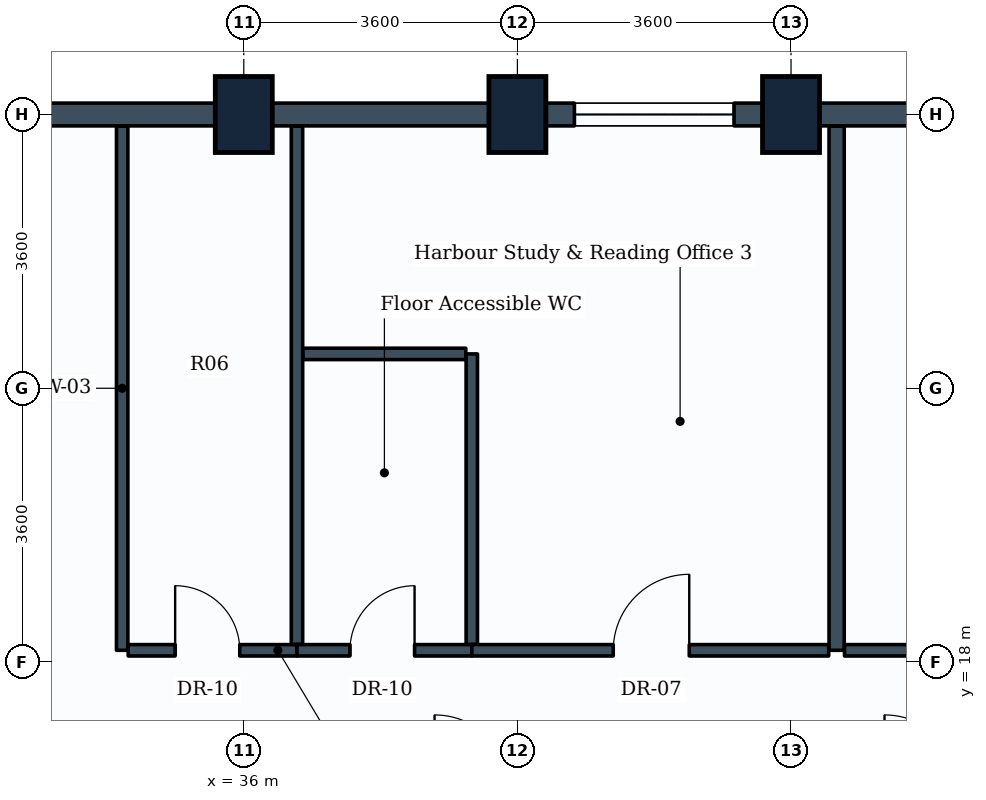
"""IFC4 building model, lengths in metres.
Left out: names, types, materials, properties, quantities, classifications, styles, units other than length and angle.
Written with IfcOpenShell. Run it as: python <this file> out.ifc"""

import sys

from ifc_helpers import new_model, si_unit, direction, frame, frame_2d, origin, origin_2d, place, context, subcontext, project, spatial, rectangle, extrude, element, fill, save


model = new_model("IFC4")
c1 = context("Model", 3, precision=1e-05, world=origin(), true_north=direction((0.0, 1.0)))
c2 = subcontext(c1, "Body", "Model", "MODEL_VIEW")
j1 = project(units=[si_unit("LENGTHUNIT", "METRE"), si_unit("PLANEANGLEUNIT", "RADIAN")], contexts=[c1])
p1 = place(None, origin())
s1 = spatial("IfcSite", under=j1, at=p1, CompositionType="ELEMENT")
p2 = place(p1, origin())
s2 = spatial("IfcBuilding", under=s1, at=p2, CompositionType="ELEMENT")
p3 = place(p2, frame((0.0, 0.0, 139.0)))
s3 = spatial("IfcBuildingStorey", under=s2, at=p3, CompositionType="ELEMENT", Elevation=139.0)
for number, where, z_axis, x_axis in (
    (1, (36.0, 25.2, 0.0), (0.0, 0.0, 1.0), (1.0, 0.0, 0.0)),
    (2, (39.6, 25.2, 0.0), (0.0, 0.0, 1.0), (1.0, 0.0, 0.0)),
    (3, (43.2, 25.2, 0.0), (0.0, 0.0, 1.0), (1.0, 0.0, 0.0)),
):
    element("IfcColumn", number, at=place(p3, frame(where, z_axis=z_axis, x_axis=x_axis)), inside=s3, PredefinedType="COLUMN", context=c2, shape_type="SweptSolid", body=[
        extrude(rectangle(XDim=0.75, YDim=1.0, at=origin_2d()), origin(), (0.0, 0.0, 1.0), 3.8),
    ])
p4 = place(p3, frame((43.2, 25.2, 0.0), z_axis=(0.0, 0.0, 1.0), x_axis=(1.0, 0.0, 0.0)))
e4 = element("IfcWall", 4, at=p4, inside=s3, PredefinedType="STANDARD", context=c2, shape_type="SweptSolid", body=[
    extrude(rectangle(XDim=3.6, YDim=0.3, at=frame_2d((1.8, 0.0))), origin(), (0.0, 0.0, 1.0), 2.93),
])
p5 = place(p3, frame((39.6, 25.2, 0.0), z_axis=(0.0, 0.0, 1.0), x_axis=(1.0, 0.0, 0.0)))
e5 = element("IfcWall", 5, at=p5, inside=s3, PredefinedType="STANDARD", context=c2, shape_type="SweptSolid", body=[
    extrude(rectangle(XDim=3.6, YDim=0.3, at=frame_2d((1.8, 0.0))), origin(), (0.0, 0.0, 1.0), 2.93),
])
p6 = place(p5, frame((0.75, 0.0, 0.85)))
e6 = element("IfcOpeningElement", 6, at=p6, cuts=e5, PredefinedType="OPENING", context=c2, shape_type="SweptSolid", body=[
    extrude(rectangle(XDim=2.1, YDim=1.35, at=frame_2d((1.05, 0.675))), frame((0.0, 0.16, 0.0), z_axis=(0.0, -1.0, 0.0), x_axis=(1.0, 0.0, 0.0)), (0.0, 0.0, 1.0), 0.32),
])
for number, where, z_axis, x_axis in (
    (7, (36.0, 25.2, 0.0), (0.0, 0.0, 1.0), (1.0, 0.0, 0.0)),
    (8, (32.4, 25.2, 0.0), (0.0, 0.0, 1.0), (1.0, 0.0, 0.0)),
):
    element("IfcWall", number, at=place(p3, frame(where, z_axis=z_axis, x_axis=x_axis)), inside=s3, PredefinedType="STANDARD", context=c2, shape_type="SweptSolid", body=[
        extrude(rectangle(XDim=3.6, YDim=0.3, at=frame_2d((1.8, 0.0))), origin(), (0.0, 0.0, 1.0), 2.93),
    ])
p7 = place(p3, frame((34.4, 18.15, 0.0), z_axis=(0.0, 0.0, 1.0), x_axis=(0.0, 1.0, 0.0)))
e9 = element("IfcWall", 9, at=p7, inside=s3, PredefinedType="PARTITIONING", context=c2, shape_type="SweptSolid", body=[
    extrude(rectangle(XDim=6.896, YDim=0.15, at=frame_2d((3.448, 0.0))), origin(), (0.0, 0.0, 1.0), 2.93),
])
p8 = place(p3, frame((34.479, 18.15, 0.0), z_axis=(0.0, 0.0, 1.0), x_axis=(1.0, 0.0, 0.0)))
e10 = element("IfcWall", 10, at=p8, inside=s3, PredefinedType="PARTITIONING", context=c2, shape_type="SweptSolid", body=[
    extrude(rectangle(XDim=2.221, YDim=0.15, at=frame_2d((1.11, 0.0))), origin(), (0.0, 0.0, 1.0), 3.08),
])
p9 = place(p8, frame((0.618, 0.0, 0.0)))
e11 = element("IfcOpeningElement", 11, at=p9, cuts=e10, PredefinedType="OPENING", context=c2, shape_type="SweptSolid", body=[
    extrude(rectangle(XDim=0.85, YDim=2.1, at=frame_2d((0.425, 1.05))), frame((0.0, 0.085, 0.0), z_axis=(0.0, -1.0, 0.0), x_axis=(1.0, 0.0, 0.0)), (0.0, 0.0, 1.0), 0.17),
])
p10 = place(p3, frame((36.7, 18.229, 0.0), z_axis=(0.0, 0.0, 1.0), x_axis=(0.0, 1.0, 0.0)))
e12 = element("IfcWall", 12, at=p10, inside=s3, PredefinedType="PARTITIONING", context=c2, shape_type="SweptSolid", body=[
    extrude(rectangle(XDim=6.817, YDim=0.15, at=frame_2d((3.408, 0.0))), origin(), (0.0, 0.0, 1.0), 2.93),
])
p11 = place(p3, frame((36.7, 18.15, 0.0), z_axis=(0.0, 0.0, 1.0), x_axis=(1.0, 0.0, 0.0)))
e13 = element("IfcWall", 13, at=p11, inside=s3, PredefinedType="PARTITIONING", context=c2, shape_type="SweptSolid", body=[
    extrude(rectangle(XDim=2.3, YDim=0.15, at=frame_2d((1.15, 0.0))), origin(), (0.0, 0.0, 1.0), 3.08),
])
p12 = place(p11, frame((0.697, 0.0, 0.0)))
e14 = element("IfcOpeningElement", 14, at=p12, cuts=e13, PredefinedType="OPENING", context=c2, shape_type="SweptSolid", body=[
    extrude(rectangle(XDim=0.85, YDim=2.1, at=frame_2d((0.425, 1.05))), frame((0.0, 0.085, 0.0), z_axis=(0.0, -1.0, 0.0), x_axis=(1.0, 0.0, 0.0)), (0.0, 0.0, 1.0), 0.17),
])
p13 = place(p3, frame((39.0, 18.229, 0.0), z_axis=(0.0, 0.0, 1.0), x_axis=(0.0, 1.0, 0.0)))
e15 = element("IfcWall", 15, at=p13, inside=s3, PredefinedType="PARTITIONING", context=c2, shape_type="SweptSolid", body=[
    extrude(rectangle(XDim=3.821, YDim=0.15, at=frame_2d((1.911, 0.0))), origin(), (0.0, 0.0, 1.0), 3.08),
])
p14 = place(p3, frame((36.779, 22.05, 0.0), z_axis=(0.0, 0.0, 1.0), x_axis=(1.0, 0.0, 0.0)))
e16 = element("IfcWall", 16, at=p14, inside=s3, PredefinedType="PARTITIONING", context=c2, shape_type="SweptSolid", body=[
    extrude(rectangle(XDim=2.142, YDim=0.15, at=frame_2d((1.071, 0.0))), origin(), (0.0, 0.0, 1.0), 3.535),
])
p15 = place(p3, frame((43.8, 18.15, 0.0), z_axis=(0.0, 0.0, 1.0), x_axis=(0.0, 1.0, 0.0)))
e17 = element("IfcWall", 17, at=p15, inside=s3, PredefinedType="PARTITIONING", context=c2, shape_type="SweptSolid", body=[
    extrude(rectangle(XDim=6.896, YDim=0.2, at=frame_2d((3.448, 0.0))), origin(), (0.0, 0.0, 1.0), 2.93),
])
p16 = place(p3, frame((39.0, 18.15, 0.0), z_axis=(0.0, 0.0, 1.0), x_axis=(1.0, 0.0, 0.0)))
e18 = element("IfcWall", 18, at=p16, inside=s3, PredefinedType="PARTITIONING", context=c2, shape_type="SweptSolid", body=[
    extrude(rectangle(XDim=4.696, YDim=0.15, at=frame_2d((2.348, 0.0))), origin(), (0.0, 0.0, 1.0), 3.08),
])
p17 = place(p16, frame((1.861, 0.0, 0.0)))
e19 = element("IfcOpeningElement", 19, at=p17, cuts=e18, PredefinedType="OPENING", context=c2, shape_type="SweptSolid", body=[
    extrude(rectangle(XDim=1.0, YDim=2.1, at=frame_2d((0.5, 1.05))), frame((0.0, 0.085, 0.0), z_axis=(0.0, -1.0, 0.0), x_axis=(1.0, 0.0, 0.0)), (0.0, 0.0, 1.0), 0.17),
])
p18 = place(p3, frame((43.904, 18.15, 0.0), z_axis=(0.0, 0.0, 1.0), x_axis=(1.0, 0.0, 0.0)))
e20 = element("IfcWall", 20, at=p18, inside=s3, PredefinedType="PARTITIONING", context=c2, shape_type="SweptSolid", body=[
    extrude(rectangle(XDim=4.696, YDim=0.15, at=frame_2d((2.348, 0.0))), origin(), (0.0, 0.0, 1.0), 3.17),
])
p19 = place(p18, frame((1.757, 0.0, 0.0)))
e21 = element("IfcOpeningElement", 21, at=p19, cuts=e20, PredefinedType="OPENING", context=c2, shape_type="SweptSolid", body=[
    extrude(rectangle(XDim=1.0, YDim=2.1, at=frame_2d((0.5, 1.05))), frame((0.0, 0.085, 0.0), z_axis=(0.0, -1.0, 0.0), x_axis=(1.0, 0.0, 0.0)), (0.0, 0.0, 1.0), 0.17),
])
p20 = place(p6, origin())
e22 = element("IfcWindow", 22, at=p20, inside=s3, PartitioningType="SINGLE_PANEL", PredefinedType="WINDOW", context=c2, shape_type="SweptSolid", body=[
    extrude(rectangle(XDim=2.1, YDim=1.35, at=frame_2d((1.05, 0.675))), frame((0.0, 0.03, 0.0), z_axis=(0.0, -1.0, 0.0), x_axis=(1.0, 0.0, 0.0)), (0.0, 0.0, 1.0), 0.06),
])
fill(e6, e22)
p21 = place(p9, origin())
e23 = element("IfcDoor", 23, at=p21, inside=s3, OperationType="SINGLE_SWING_LEFT", PredefinedType="DOOR", context=c2, shape_type="SweptSolid", body=[
    extrude(rectangle(XDim=0.85, YDim=2.1, at=frame_2d((0.425, 1.05))), frame((0.0, 0.025, 0.0), z_axis=(0.0, -1.0, 0.0), x_axis=(1.0, 0.0, 0.0)), (0.0, 0.0, 1.0), 0.05),
])
fill(e11, e23)
p22 = place(p12, origin())
e24 = element("IfcDoor", 24, at=p22, inside=s3, OperationType="SINGLE_SWING_RIGHT", PredefinedType="DOOR", context=c2, shape_type="SweptSolid", body=[
    extrude(rectangle(XDim=0.85, YDim=2.1, at=frame_2d((0.425, 1.05))), frame((0.0, 0.025, 0.0), z_axis=(0.0, -1.0, 0.0), x_axis=(1.0, 0.0, 0.0)), (0.0, 0.0, 1.0), 0.05),
])
fill(e14, e24)
p23 = place(p17, origin())
e25 = element("IfcDoor", 25, at=p23, inside=s3, OperationType="SINGLE_SWING_RIGHT", PredefinedType="DOOR", context=c2, shape_type="SweptSolid", body=[
    extrude(rectangle(XDim=1.0, YDim=2.1, at=frame_2d((0.5, 1.05))), frame((0.0, 0.025, 0.0), z_axis=(0.0, -1.0, 0.0), x_axis=(1.0, 0.0, 0.0)), (0.0, 0.0, 1.0), 0.05),
])
fill(e19, e25)
save(model, sys.argv[1])
